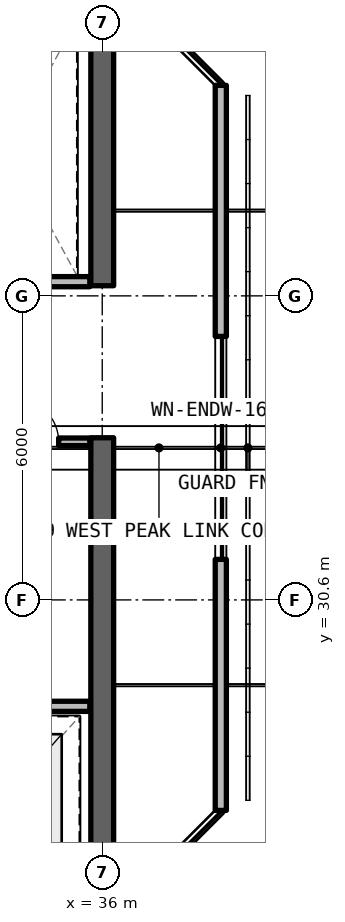
"""IFC4 building model, lengths in metres.
Left out: names, types, materials, properties, quantities, classifications, styles, units other than length and angle.
Written with IfcOpenShell. Run it as: python <this file> out.ifc"""

import sys

from ifc_helpers import new_model, si_unit, direction, frame, frame_2d, origin, place, context, subcontext, project, spatial, rectangle, extrude, element, fill, save


model = new_model("IFC4")
c1 = context("Model", 3, precision=1e-05, world=origin(), true_north=direction((0.0, 1.0)))
c2 = subcontext(c1, "Body", "Model", "MODEL_VIEW")
j1 = project(units=[si_unit("LENGTHUNIT", "METRE"), si_unit("PLANEANGLEUNIT", "RADIAN")], contexts=[c1])
p1 = place(None, origin())
s1 = spatial("IfcSite", under=j1, at=p1, CompositionType="ELEMENT")
p2 = place(p1, origin())
s2 = spatial("IfcBuilding", under=s1, at=p2, CompositionType="ELEMENT")
p3 = place(p2, frame((0.0, 0.0, 232.65)))
s3 = spatial("IfcBuildingStorey", under=s2, at=p3, CompositionType="ELEMENT", Elevation=232.65)
p4 = place(p3, frame((36.0, 24.825, 0.0), z_axis=(0.0, 0.0, 1.0), x_axis=(0.0, 1.0, 0.0)))
e1 = element("IfcWall", 1, at=p4, inside=s3, PredefinedType="SHEAR", context=c2, shape_type="SweptSolid", body=[
    extrude(rectangle(XDim=8.975, YDim=0.45, at=frame_2d((4.488, 0.0))), origin(), (0.0, 0.0, 1.0), 3.3),
])
p5 = place(p3, frame((36.0, 36.8, 0.0), z_axis=(0.0, 0.0, 1.0), x_axis=(0.0, 1.0, 0.0)))
e2 = element("IfcWall", 2, at=p5, inside=s3, PredefinedType="SHEAR", context=c2, shape_type="SweptSolid", body=[
    extrude(rectangle(XDim=5.575, YDim=0.45, at=frame_2d((2.788, 0.0))), origin(), (0.0, 0.0, 1.0), 3.3),
])
p6 = place(p3, frame((38.34, 26.446, 0.0), z_axis=(0.0, 0.0, 1.0), x_axis=(0.0, 1.0, 0.0)))
e3 = element("IfcWall", 3, at=p6, inside=s3, PredefinedType="SOLIDWALL", context=c2, shape_type="SweptSolid", body=[
    extrude(rectangle(XDim=14.309, YDim=0.22, at=frame_2d((7.154, 0.0))), origin(), (0.0, 0.0, 1.0), 3.08),
])
p7 = place(p6, frame((4.954, 0.0, 0.78)))
e4 = element("IfcOpeningElement", 4, at=p7, cuts=e3, PredefinedType="OPENING", context=c2, shape_type="SweptSolid", body=[
    extrude(rectangle(XDim=4.4, YDim=1.66, at=frame_2d((2.2, 0.83))), frame((0.0, 0.12, 0.0), z_axis=(0.0, -1.0, 0.0), x_axis=(1.0, 0.0, 0.0)), (0.0, 0.0, 1.0), 0.24),
])
p8 = place(p3, frame((28.17, 28.5, 0.0), z_axis=(0.0, 0.0, 1.0), x_axis=(1.0, 0.0, 0.0)))
e5 = element("IfcWall", 5, at=p8, inside=s3, PredefinedType="SOLIDWALL", context=c2, shape_type="SweptSolid", body=[
    extrude(rectangle(XDim=7.585, YDim=0.2, at=frame_2d((3.792, 0.0))), origin(), (0.0, 0.0, 1.0), 2.35),
])
p9 = place(p8, frame((3.03, 0.0, 0.0)))
e6 = element("IfcOpeningElement", 6, at=p9, cuts=e5, PredefinedType="OPENING", context=c2, shape_type="SweptSolid", body=[
    extrude(rectangle(XDim=1.0, YDim=2.15, at=frame_2d((0.5, 1.075))), frame((0.0, 0.11, 0.0), z_axis=(0.0, -1.0, 0.0), x_axis=(1.0, 0.0, 0.0)), (0.0, 0.0, 1.0), 0.22),
])
p10 = place(p3, frame((34.01, 33.72, 0.0), z_axis=(0.0, 0.0, 1.0), x_axis=(1.0, 0.0, 0.0)))
e7 = element("IfcWall", 7, at=p10, inside=s3, PredefinedType="SOLIDWALL", context=c2, shape_type="SweptSolid", body=[
    extrude(rectangle(XDim=1.745, YDim=0.15, at=frame_2d((0.873, 0.0))), origin(), (0.0, 0.0, 1.0), 2.35),
])
p11 = place(p10, frame((0.28, 0.0, 0.0)))
e8 = element("IfcOpeningElement", 8, at=p11, cuts=e7, PredefinedType="OPENING", context=c2, shape_type="SweptSolid", body=[
    extrude(rectangle(XDim=0.85, YDim=2.1, at=frame_2d((0.425, 1.05))), frame((0.0, 0.085, 0.0), z_axis=(0.0, -1.0, 0.0), x_axis=(1.0, 0.0, 0.0)), (0.0, 0.0, 1.0), 0.17),
])
p12 = place(p3, frame((32.68, 36.88, 0.0), z_axis=(0.0, 0.0, 1.0), x_axis=(1.0, 0.0, 0.0)))
e9 = element("IfcWall", 9, at=p12, inside=s3, PredefinedType="SOLIDWALL", context=c2, shape_type="SweptSolid", body=[
    extrude(rectangle(XDim=3.075, YDim=0.2, at=frame_2d((1.538, 0.0))), origin(), (0.0, 0.0, 1.0), 2.35),
])
p13 = place(p7, origin())
e10 = element("IfcWindow", 10, at=p13, inside=s3, PartitioningType="SINGLE_PANEL", PredefinedType="WINDOW", context=c2, shape_type="SweptSolid", body=[
    extrude(rectangle(XDim=4.4, YDim=1.66, at=frame_2d((2.2, 0.83))), frame((0.0, 0.03, 0.0), z_axis=(0.0, -1.0, 0.0), x_axis=(1.0, 0.0, 0.0)), (0.0, 0.0, 1.0), 0.06),
])
fill(e4, e10)
p14 = place(p11, origin())
e11 = element("IfcDoor", 11, at=p14, inside=s3, OperationType="SINGLE_SWING_LEFT", PredefinedType="DOOR", context=c2, shape_type="SweptSolid", body=[
    extrude(rectangle(XDim=0.85, YDim=2.1, at=frame_2d((0.425, 1.05))), frame((0.0, 0.025, 0.0), z_axis=(0.0, -1.0, 0.0), x_axis=(1.0, 0.0, 0.0)), (0.0, 0.0, 1.0), 0.05),
])
fill(e8, e11)
save(model, sys.argv[1])
